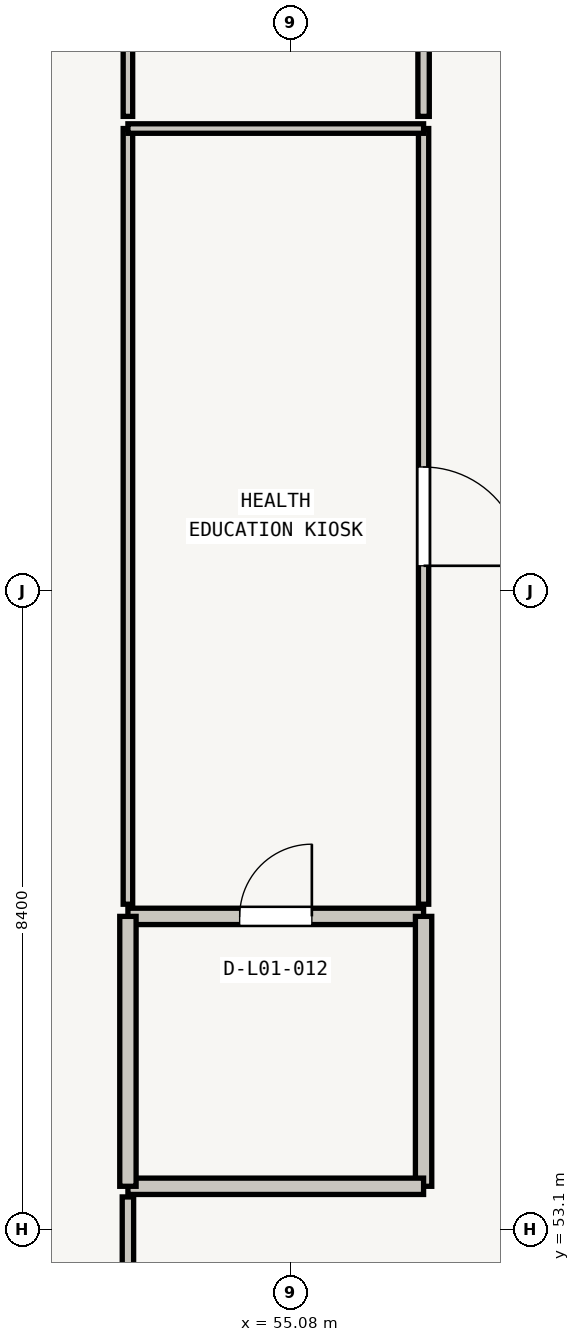
"""IFC4 building model, lengths in metres.
Left out: names, types, materials, properties, quantities, classifications, styles, units other than length and angle.
Written with IfcOpenShell. Run it as: python <this file> out.ifc"""

import sys

from ifc_helpers import new_model, si_unit, direction, frame, frame_2d, origin, place, context, subcontext, project, spatial, rectangle, extrude, element, fill, save


model = new_model("IFC4")
c1 = context("Model", 3, precision=1e-05, world=origin(), true_north=direction((0.0, 1.0)))
c2 = subcontext(c1, "Body", "Model", "MODEL_VIEW")
j1 = project(units=[si_unit("LENGTHUNIT", "METRE"), si_unit("PLANEANGLEUNIT", "RADIAN")], contexts=[c1])
p1 = place(None, origin())
s1 = spatial("IfcSite", under=j1, at=p1, CompositionType="ELEMENT")
p2 = place(p1, origin())
s2 = spatial("IfcBuilding", under=s1, at=p2, CompositionType="ELEMENT")
p3 = place(p2, frame((0.0, 0.0, 4.5)))
s3 = spatial("IfcBuildingStorey", under=s2, at=p3, CompositionType="ELEMENT", Elevation=4.5)
p4 = place(p3, frame((52.94, 57.22, 0.0), z_axis=(0.0, 0.0, 1.0), x_axis=(1.0, 0.0, 0.0)))
e1 = element("IfcWall", 1, at=p4, inside=s3, PredefinedType="PLUMBINGWALL", context=c2, shape_type="SweptSolid", body=[
    extrude(rectangle(XDim=3.89, YDim=0.215, at=frame_2d((1.945, 0.0))), origin(), (0.0, 0.0, 1.0), 2.94),
])
p5 = place(p4, frame((1.47, 0.0, 0.0)))
e2 = element("IfcOpeningElement", 2, at=p5, cuts=e1, PredefinedType="OPENING", context=c2, shape_type="SweptSolid", body=[
    extrude(rectangle(XDim=0.95, YDim=2.05, at=frame_2d((0.475, 1.025))), frame((0.0, 0.107, 0.0), z_axis=(0.0, -1.0, 0.0), x_axis=(1.0, 0.0, 0.0)), (0.0, 0.0, 1.0), 0.215),
])
p6 = place(p3, frame((56.83, 57.22, 0.0), z_axis=(0.0, 0.0, 1.0), x_axis=(0.0, -1.0, 0.0)))
e3 = element("IfcWall", 3, at=p6, inside=s3, PredefinedType="PLUMBINGWALL", context=c2, shape_type="SweptSolid", body=[
    extrude(rectangle(XDim=3.551, YDim=0.215, at=frame_2d((1.775, 0.0))), origin(), (0.0, 0.0, 1.0), 2.94),
])
p7 = place(p3, frame((56.83, 53.669, 0.0), z_axis=(0.0, 0.0, 1.0), x_axis=(-1.0, 0.0, 0.0)))
e4 = element("IfcWall", 4, at=p7, inside=s3, PredefinedType="PLUMBINGWALL", context=c2, shape_type="SweptSolid", body=[
    extrude(rectangle(XDim=3.89, YDim=0.215, at=frame_2d((1.945, 0.0))), origin(), (0.0, 0.0, 1.0), 2.94),
])
p8 = place(p3, frame((52.94, 53.669, 0.0), z_axis=(0.0, 0.0, 1.0), x_axis=(0.0, 1.0, 0.0)))
e5 = element("IfcWall", 5, at=p8, inside=s3, PredefinedType="PLUMBINGWALL", context=c2, shape_type="SweptSolid", body=[
    extrude(rectangle(XDim=3.551, YDim=0.215, at=frame_2d((1.775, 0.0))), origin(), (0.0, 0.0, 1.0), 2.94),
])
p9 = place(p3, frame((52.94, 41.6, 0.0), z_axis=(0.0, 0.0, 1.0), x_axis=(0.0, 1.0, 0.0)))
e6 = element("IfcWall", 6, at=p9, inside=s3, PredefinedType="PARTITIONING", context=c2, shape_type="SweptSolid", body=[
    extrude(rectangle(XDim=11.929, YDim=0.15, at=frame_2d((5.964, 0.0))), origin(), (0.0, 0.0, 1.0), 2.94),
])
p10 = place(p9, frame((5.445, 0.0, 0.0)))
e7 = element("IfcOpeningElement", 7, at=p10, cuts=e6, PredefinedType="OPENING", context=c2, shape_type="SweptSolid", body=[
    extrude(rectangle(XDim=1.04, YDim=2.05, at=frame_2d((0.52, 1.025))), frame((0.0, 0.075, 0.0), z_axis=(0.0, -1.0, 0.0), x_axis=(1.0, 0.0, 0.0)), (0.0, 0.0, 1.0), 0.15),
])
p11 = place(p3, frame((56.83, 67.585, 0.0), z_axis=(0.0, 0.0, 1.0), x_axis=(0.0, -1.0, 0.0)))
e8 = element("IfcWall", 8, at=p11, inside=s3, PredefinedType="MOVABLE", context=c2, shape_type="SweptSolid", body=[
    extrude(rectangle(XDim=10.205, YDim=0.135, at=frame_2d((5.103, 0.0))), origin(), (0.0, 0.0, 1.0), 2.94),
])
p12 = place(p11, frame((4.452, 0.0, 0.0)))
e9 = element("IfcOpeningElement", 9, at=p12, cuts=e8, PredefinedType="OPENING", context=c2, shape_type="SweptSolid", body=[
    extrude(rectangle(XDim=1.3, YDim=2.1, at=frame_2d((0.65, 1.05))), frame((0.0, 0.067, 0.0), z_axis=(0.0, -1.0, 0.0), x_axis=(1.0, 0.0, 0.0)), (0.0, 0.0, 1.0), 0.135),
])
p13 = place(p3, frame((52.94, 57.38, 0.0), z_axis=(0.0, 0.0, 1.0), x_axis=(0.0, 1.0, 0.0)))
e10 = element("IfcWall", 10, at=p13, inside=s3, PredefinedType="PARTITIONING", context=c2, shape_type="SweptSolid", body=[
    extrude(rectangle(XDim=10.205, YDim=0.125, at=frame_2d((5.103, 0.0))), origin(), (0.0, 0.0, 1.0), 2.94),
])
p14 = place(p3, frame((52.94, 67.585, 0.0), z_axis=(0.0, 0.0, 1.0), x_axis=(1.0, 0.0, 0.0)))
e11 = element("IfcWall", 11, at=p14, inside=s3, PredefinedType="PARTITIONING", context=c2, shape_type="SweptSolid", body=[
    extrude(rectangle(XDim=3.89, YDim=0.125, at=frame_2d((1.945, 0.0))), origin(), (0.0, 0.0, 1.0), 2.94),
])
p15 = place(p3, frame((56.83, 77.95, 0.0), z_axis=(0.0, 0.0, 1.0), x_axis=(0.0, -1.0, 0.0)))
e12 = element("IfcWall", 12, at=p15, inside=s3, PredefinedType="PARTITIONING", context=c2, shape_type="SweptSolid", body=[
    extrude(rectangle(XDim=10.205, YDim=0.15, at=frame_2d((5.103, 0.0))), origin(), (0.0, 0.0, 1.0), 2.94),
])
p16 = place(p15, frame((4.583, 0.0, 0.0)))
e13 = element("IfcOpeningElement", 13, at=p16, cuts=e12, PredefinedType="OPENING", context=c2, shape_type="SweptSolid", body=[
    extrude(rectangle(XDim=1.04, YDim=2.05, at=frame_2d((0.52, 1.025))), frame((0.0, 0.075, 0.0), z_axis=(0.0, -1.0, 0.0), x_axis=(1.0, 0.0, 0.0)), (0.0, 0.0, 1.0), 0.15),
])
p17 = place(p3, frame((52.94, 67.745, 0.0), z_axis=(0.0, 0.0, 1.0), x_axis=(0.0, 1.0, 0.0)))
e14 = element("IfcWall", 14, at=p17, inside=s3, PredefinedType="PARTITIONING", context=c2, shape_type="SweptSolid", body=[
    extrude(rectangle(XDim=10.205, YDim=0.125, at=frame_2d((5.103, 0.0))), origin(), (0.0, 0.0, 1.0), 2.94),
])
p18 = place(p5, origin())
e15 = element("IfcDoor", 15, at=p18, inside=s3, OperationType="SINGLE_SWING_RIGHT", PredefinedType="DOOR", context=c2, shape_type="SweptSolid", body=[
    extrude(rectangle(XDim=0.95, YDim=2.05, at=frame_2d((0.475, 1.025))), frame((0.0, 0.025, 0.0), z_axis=(0.0, -1.0, 0.0), x_axis=(1.0, 0.0, 0.0)), (0.0, 0.0, 1.0), 0.05),
])
fill(e2, e15)
p19 = place(p12, origin())
e16 = element("IfcDoor", 16, at=p19, inside=s3, OperationType="SINGLE_SWING_RIGHT", PredefinedType="DOOR", context=c2, shape_type="SweptSolid", body=[
    extrude(rectangle(XDim=1.3, YDim=2.1, at=frame_2d((0.65, 1.05))), frame((0.0, 0.025, 0.0), z_axis=(0.0, -1.0, 0.0), x_axis=(1.0, 0.0, 0.0)), (0.0, 0.0, 1.0), 0.05),
])
fill(e9, e16)
save(model, sys.argv[1])
